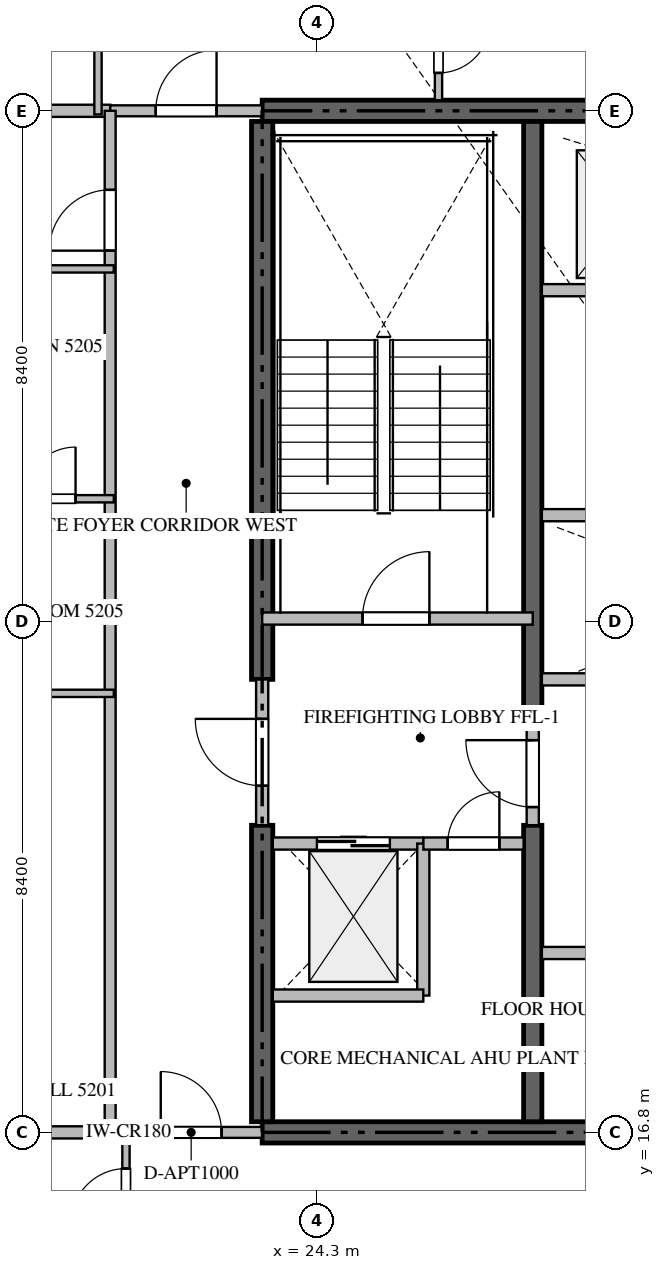
"""IFC4 building model, lengths in metres.
Left out: names, types, materials, properties, quantities, classifications, styles, units other than length and angle.
Written with IfcOpenShell. Run it as: python <this file> out.ifc"""

import sys

from ifc_helpers import new_model, si_unit, direction, frame, frame_2d, origin, place, context, subcontext, project, spatial, rectangle, extrude, source, transform, mapped, element, fill, save


model = new_model("IFC4")
c1 = context("Model", 3, precision=1e-05, world=origin(), true_north=direction((0.0, 1.0)))
c2 = subcontext(c1, "Body", "Model", "MODEL_VIEW")
j1 = project(units=[si_unit("LENGTHUNIT", "METRE"), si_unit("PLANEANGLEUNIT", "RADIAN")], contexts=[c1])
p1 = place(None, origin())
s1 = spatial("IfcSite", under=j1, at=p1, CompositionType="ELEMENT")
p2 = place(p1, origin())
s2 = spatial("IfcBuilding", under=s1, at=p2, CompositionType="ELEMENT")
p3 = place(p2, frame((0.0, 0.0, 210.45)))
s3 = spatial("IfcBuildingStorey", under=s2, at=p3, CompositionType="ELEMENT", Elevation=210.45)
for number, where, z_axis, x_axis in (
    (1, (23.4, 16.8, -0.44), (0.0, 0.0, 1.0), (1.0, 0.0, 0.0)),
    (2, (41.4, 33.6, -0.44), (0.0, 0.0, 1.0), (-1.0, 0.0, 0.0)),
):
    element("IfcWall", number, at=place(p3, frame(where, z_axis=z_axis, x_axis=x_axis)), inside=s3, PredefinedType="SHEAR", context=c2, shape_type="SweptSolid", body=[
        extrude(rectangle(XDim=18.0, YDim=0.35, at=frame_2d((9.0, 0.0))), origin(), (0.0, 0.0, 1.0), 4.028),
    ])
p4 = place(p3, frame((23.4, 16.975, -0.44), z_axis=(0.0, 0.0, 1.0), x_axis=(0.0, 1.0, 0.0)))
e3 = element("IfcWall", 3, at=p4, inside=s3, PredefinedType="SHEAR", context=c2, shape_type="SweptSolid", body=[
    extrude(rectangle(XDim=4.875, YDim=0.35, at=frame_2d((2.438, 0.0))), origin(), (0.0, 0.0, 1.0), 4.028),
])
p5 = place(p3, frame((23.4, 24.25, -0.44), z_axis=(0.0, 0.0, 1.0), x_axis=(0.0, 1.0, 0.0)))
e4 = element("IfcWall", 4, at=p5, inside=s3, PredefinedType="SHEAR", context=c2, shape_type="SweptSolid", body=[
    extrude(rectangle(XDim=9.175, YDim=0.35, at=frame_2d((4.587, 0.0))), origin(), (0.0, 0.0, 1.0), 4.028),
])
p6 = place(p3, frame((27.85, 16.975, -0.44), z_axis=(0.0, 0.0, 1.0), x_axis=(0.0, 1.0, 0.0)))
e5 = element("IfcWall", 5, at=p6, inside=s3, PredefinedType="SHEAR", context=c2, shape_type="SweptSolid", body=[
    extrude(rectangle(XDim=4.875, YDim=0.3, at=frame_2d((2.438, 0.0))), origin(), (0.0, 0.0, 1.0), 4.028),
])
p7 = place(p3, frame((27.85, 23.55, -0.44), z_axis=(0.0, 0.0, 1.0), x_axis=(0.0, 1.0, 0.0)))
e6 = element("IfcWall", 6, at=p7, inside=s3, PredefinedType="SHEAR", context=c2, shape_type="SweptSolid", body=[
    extrude(rectangle(XDim=9.875, YDim=0.3, at=frame_2d((4.938, 0.0))), origin(), (0.0, 0.0, 1.0), 4.028),
])
p8 = place(p3, frame((23.4, 25.25, 0.0), z_axis=(0.0, 0.0, 1.0), x_axis=(1.0, 0.0, 0.0)))
e7 = element("IfcWall", 7, at=p8, inside=s3, PredefinedType="STANDARD", context=c2, shape_type="SweptSolid", body=[
    extrude(rectangle(XDim=4.45, YDim=0.2, at=frame_2d((2.225, 0.0))), origin(), (0.0, 0.0, 1.0), 3.59),
])
p9 = place(p8, frame((1.65, 0.0, 0.0)))
e8 = element("IfcOpeningElement", 8, at=p9, cuts=e7, PredefinedType="OPENING", context=c2, shape_type="SweptSolid", body=[
    extrude(rectangle(XDim=1.1, YDim=2.15, at=frame_2d((0.55, 1.075))), frame((0.0, 0.11, 0.0), z_axis=(0.0, -1.0, 0.0), x_axis=(1.0, 0.0, 0.0)), (0.0, 0.0, 1.0), 0.22),
])
p10 = place(p3, frame((23.575, 21.55, 0.0), z_axis=(0.0, 0.0, 1.0), x_axis=(1.0, 0.0, 0.0)))
e9 = element("IfcWall", 9, at=p10, inside=s3, PredefinedType="STANDARD", context=c2, shape_type="SweptSolid", body=[
    extrude(rectangle(XDim=2.475, YDim=0.2, at=frame_2d((1.238, 0.0))), origin(), (0.0, 0.0, 1.0), 3.59),
])
p11 = place(p10, frame((0.725, 0.0, 0.0)))
e10 = element("IfcOpeningElement", 10, at=p11, cuts=e9, PredefinedType="OPENING", context=c2, shape_type="SweptSolid", body=[
    extrude(rectangle(XDim=1.2, YDim=2.2, at=frame_2d((0.6, 1.1))), frame((0.0, 0.11, 0.0), z_axis=(0.0, -1.0, 0.0), x_axis=(1.0, 0.0, 0.0)), (0.0, 0.0, 1.0), 0.22),
])
p12 = place(p3, frame((28.0, 24.25, 0.0), z_axis=(0.0, 0.0, 1.0), x_axis=(1.0, 0.0, 0.0)))
e11 = element("IfcWall", 11, at=p12, inside=s3, PredefinedType="STANDARD", context=c2, shape_type="SweptSolid", body=[
    extrude(rectangle(XDim=2.425, YDim=0.2, at=frame_2d((1.212, 0.0))), origin(), (0.0, 0.0, 1.0), 3.59),
])
p13 = place(p3, frame((28.0, 30.65, 0.0), z_axis=(0.0, 0.0, 1.0), x_axis=(1.0, 0.0, 0.0)))
e12 = element("IfcWall", 12, at=p13, inside=s3, PredefinedType="STANDARD", context=c2, shape_type="SweptSolid", body=[
    extrude(rectangle(XDim=2.55, YDim=0.2, at=frame_2d((1.275, 0.0))), origin(), (0.0, 0.0, 1.0), 3.59),
])
p14 = place(p13, frame((0.85, 0.0, 0.0)))
e13 = element("IfcOpeningElement", 13, at=p14, cuts=e12, PredefinedType="OPENING", context=c2, shape_type="SweptSolid", body=[
    extrude(rectangle(XDim=1.1, YDim=2.2, at=frame_2d((0.55, 1.1))), frame((0.0, 0.11, 0.0), z_axis=(0.0, -1.0, 0.0), x_axis=(1.0, 0.0, 0.0)), (0.0, 0.0, 1.0), 0.22),
])
p15 = place(p3, frame((26.05, 19.05, 0.0), z_axis=(0.0, 0.0, 1.0), x_axis=(0.0, 1.0, 0.0)))
e14 = element("IfcWall", 14, at=p15, inside=s3, PredefinedType="STANDARD", context=c2, shape_type="SweptSolid", body=[
    extrude(rectangle(XDim=2.5, YDim=0.2, at=frame_2d((1.25, 0.0))), origin(), (0.0, 0.0, 1.0), 3.59),
])
p16 = place(p3, frame((23.575, 19.05, 0.0), z_axis=(0.0, 0.0, 1.0), x_axis=(1.0, 0.0, 0.0)))
e15 = element("IfcWall", 15, at=p16, inside=s3, PredefinedType="STANDARD", context=c2, shape_type="SweptSolid", body=[
    extrude(rectangle(XDim=2.475, YDim=0.2, at=frame_2d((1.238, 0.0))), origin(), (0.0, 0.0, 1.0), 3.59),
])
p17 = place(p3, frame((26.052, 21.55, 0.0), z_axis=(0.0, 0.0, 1.0), x_axis=(1.0, 0.0, 0.0)))
e16 = element("IfcWall", 16, at=p17, inside=s3, PredefinedType="STANDARD", context=c2, shape_type="SweptSolid", body=[
    extrude(rectangle(XDim=1.648, YDim=0.2, at=frame_2d((0.824, 0.0))), origin(), (0.0, 0.0, 1.0), 3.59),
])
p18 = place(p17, frame((0.399, 0.0, 0.0)))
e17 = element("IfcOpeningElement", 17, at=p18, cuts=e16, PredefinedType="OPENING", context=c2, shape_type="SweptSolid", body=[
    extrude(rectangle(XDim=0.85, YDim=2.1, at=frame_2d((0.425, 1.05))), frame((0.0, 0.11, 0.0), z_axis=(0.0, -1.0, 0.0), x_axis=(1.0, 0.0, 0.0)), (0.0, 0.0, 1.0), 0.22),
])
p19 = place(p3, frame((23.4, 21.852, 0.0), z_axis=(0.0, 0.0, 1.0), x_axis=(0.0, 1.0, 0.0)))
e18 = element("IfcWall", 18, at=p19, inside=s3, PredefinedType="STANDARD", context=c2, shape_type="SweptSolid", body=[
    extrude(rectangle(XDim=2.396, YDim=0.2, at=frame_2d((1.198, 0.0))), origin(), (0.0, 0.0, 1.0), 3.59),
])
p20 = place(p19, frame((0.648, 0.0, 0.0)))
e19 = element("IfcOpeningElement", 19, at=p20, cuts=e18, PredefinedType="OPENING", context=c2, shape_type="SweptSolid", body=[
    extrude(rectangle(XDim=1.1, YDim=2.15, at=frame_2d((0.55, 1.075))), frame((0.0, 0.11, 0.0), z_axis=(0.0, -1.0, 0.0), x_axis=(1.0, 0.0, 0.0)), (0.0, 0.0, 1.0), 0.22),
])
p21 = place(p3, frame((27.85, 21.852, 0.0), z_axis=(0.0, 0.0, 1.0), x_axis=(0.0, 1.0, 0.0)))
e20 = element("IfcWall", 20, at=p21, inside=s3, PredefinedType="STANDARD", context=c2, shape_type="SweptSolid", body=[
    extrude(rectangle(XDim=1.696, YDim=0.2, at=frame_2d((0.848, 0.0))), origin(), (0.0, 0.0, 1.0), 3.59),
])
p22 = place(p21, frame((0.298, 0.0, 0.0)))
e21 = element("IfcOpeningElement", 21, at=p22, cuts=e20, PredefinedType="OPENING", context=c2, shape_type="SweptSolid", body=[
    extrude(rectangle(XDim=1.1, YDim=2.15, at=frame_2d((0.55, 1.075))), frame((0.0, 0.11, 0.0), z_axis=(0.0, -1.0, 0.0), x_axis=(1.0, 0.0, 0.0)), (0.0, 0.0, 1.0), 0.22),
])
p23 = place(p3, frame((28.0, 26.95, 0.0), z_axis=(0.0, 0.0, 1.0), x_axis=(1.0, 0.0, 0.0)))
e22 = element("IfcWall", 22, at=p23, inside=s3, PredefinedType="STANDARD", context=c2, shape_type="SweptSolid", body=[
    extrude(rectangle(XDim=6.95, YDim=0.2, at=frame_2d((3.475, 0.0))), origin(), (0.0, 0.0, 1.0), 3.59),
])
p24 = place(p3, frame((28.0, 19.75, 0.0), z_axis=(0.0, 0.0, 1.0), x_axis=(1.0, 0.0, 0.0)))
e23 = element("IfcWall", 23, at=p24, inside=s3, PredefinedType="STANDARD", context=c2, shape_type="SweptSolid", body=[
    extrude(rectangle(XDim=3.9, YDim=0.2, at=frame_2d((1.95, 0.0))), origin(), (0.0, 0.0, 1.0), 3.59),
])
p25 = place(p24, frame((1.5, 0.0, 0.0)))
e24 = element("IfcOpeningElement", 24, at=p25, cuts=e23, PredefinedType="OPENING", context=c2, shape_type="SweptSolid", body=[
    extrude(rectangle(XDim=0.9, YDim=2.1, at=frame_2d((0.45, 1.05))), frame((0.0, 0.11, 0.0), z_axis=(0.0, -1.0, 0.0), x_axis=(1.0, 0.0, 0.0)), (0.0, 0.0, 1.0), 0.22),
])
for number, where, z_axis, x_axis in (
    (25, (7.482, 16.8, 0.0), (0.0, 0.0, 1.0), (1.0, 0.0, 0.0)),
    (26, (7.482, 33.6, 0.0), (0.0, 0.0, 1.0), (1.0, 0.0, 0.0)),
):
    element("IfcWall", number, at=place(p3, frame(where, z_axis=z_axis, x_axis=x_axis)), inside=s3, PredefinedType="PARTITIONING", context=c2, shape_type="SweptSolid", body=[
        extrude(rectangle(XDim=13.418, YDim=0.2, at=frame_2d((6.709, 0.0))), origin(), (0.0, 0.0, 1.0), 3.59),
    ])
p26 = place(p3, frame((20.902, 16.8, 0.0), z_axis=(0.0, 0.0, 1.0), x_axis=(1.0, 0.0, 0.0)))
e27 = element("IfcWall", 27, at=p26, inside=s3, PredefinedType="PARTITIONING", context=c2, shape_type="SweptSolid", body=[
    extrude(rectangle(XDim=2.496, YDim=0.18, at=frame_2d((1.248, 0.0))), origin(), (0.0, 0.0, 1.0), 3.59),
])
p27 = place(p26, frame((0.83, 0.0, 0.0)))
e28 = element("IfcOpeningElement", 28, at=p27, cuts=e27, PredefinedType="OPENING", context=c2, shape_type="SweptSolid", body=[
    extrude(rectangle(XDim=1.0, YDim=2.15, at=frame_2d((0.5, 1.075))), frame((0.0, 0.1, 0.0), z_axis=(0.0, -1.0, 0.0), x_axis=(1.0, 0.0, 0.0)), (0.0, 0.0, 1.0), 0.2),
])
p28 = place(p3, frame((20.902, 33.6, 0.0), z_axis=(0.0, 0.0, 1.0), x_axis=(1.0, 0.0, 0.0)))
e29 = element("IfcWall", 29, at=p28, inside=s3, PredefinedType="PARTITIONING", context=c2, shape_type="SweptSolid", body=[
    extrude(rectangle(XDim=2.496, YDim=0.18, at=frame_2d((1.248, 0.0))), origin(), (0.0, 0.0, 1.0), 3.59),
])
p29 = place(p28, frame((0.748, 0.0, 0.0)))
e30 = element("IfcOpeningElement", 30, at=p29, cuts=e29, PredefinedType="OPENING", context=c2, shape_type="SweptSolid", body=[
    extrude(rectangle(XDim=1.0, YDim=2.15, at=frame_2d((0.5, 1.075))), frame((0.0, 0.1, 0.0), z_axis=(0.0, -1.0, 0.0), x_axis=(1.0, 0.0, 0.0)), (0.0, 0.0, 1.0), 0.2),
])
p30 = place(p3, frame((20.9, 16.8, 0.0), z_axis=(0.0, 0.0, 1.0), x_axis=(0.0, 1.0, 0.0)))
e31 = element("IfcWall", 31, at=p30, inside=s3, PredefinedType="PARTITIONING", context=c2, shape_type="SweptSolid", body=[
    extrude(rectangle(XDim=16.8, YDim=0.18, at=frame_2d((8.4, 0.0))), origin(), (0.0, 0.0, 1.0), 3.59),
])
p31 = place(p30, frame((14.5, 0.0, 0.0)))
e32 = element("IfcOpeningElement", 32, at=p31, cuts=e31, PredefinedType="OPENING", context=c2, shape_type="SweptSolid", body=[
    extrude(rectangle(XDim=1.0, YDim=2.15, at=frame_2d((0.5, 1.075))), frame((0.0, 0.1, 0.0), z_axis=(0.0, -1.0, 0.0), x_axis=(1.0, 0.0, 0.0)), (0.0, 0.0, 1.0), 0.2),
])
p32 = place(p3, frame((21.16, 14.65, 0.0), z_axis=(0.0, 0.0, 1.0), x_axis=(0.0, 1.0, 0.0)))
e33 = element("IfcWall", 33, at=p32, inside=s3, PredefinedType="PARTITIONING", context=c2, shape_type="SweptSolid", body=[
    extrude(rectangle(XDim=2.21, YDim=0.12, at=frame_2d((1.105, 0.0))), origin(), (0.0, 0.0, 1.0), 3.59),
])
p33 = place(p32, frame((0.655, 0.0, 0.0)))
e34 = element("IfcOpeningElement", 34, at=p33, cuts=e33, PredefinedType="OPENING", context=c2, shape_type="SweptSolid", body=[
    extrude(rectangle(XDim=0.9, YDim=2.1, at=frame_2d((0.45, 1.05))), frame((0.0, 0.07, 0.0), z_axis=(0.0, -1.0, 0.0), x_axis=(1.0, 0.0, 0.0)), (0.0, 0.0, 1.0), 0.14),
])
p34 = place(p3, frame((20.7, 36.35, 0.0), z_axis=(0.0, 0.0, 1.0), x_axis=(0.0, -1.0, 0.0)))
e35 = element("IfcWall", 35, at=p34, inside=s3, PredefinedType="PARTITIONING", context=c2, shape_type="SweptSolid", body=[
    extrude(rectangle(XDim=2.81, YDim=0.12, at=frame_2d((1.405, 0.0))), origin(), (0.0, 0.0, 1.0), 3.59),
])
p35 = place(p3, frame((26.3, 35.648, 0.0), z_axis=(0.0, 0.0, 1.0), x_axis=(0.0, -1.0, 0.0)))
e36 = element("IfcWall", 36, at=p35, inside=s3, PredefinedType="PARTITIONING", context=c2, shape_type="SweptSolid", body=[
    extrude(rectangle(XDim=1.873, YDim=0.12, at=frame_2d((0.937, 0.0))), origin(), (0.0, 0.0, 1.0), 3.59),
])
p36 = place(p35, frame((0.575, 0.0, 0.0)))
e37 = element("IfcOpeningElement", 37, at=p36, cuts=e36, PredefinedType="OPENING", context=c2, shape_type="SweptSolid", body=[
    extrude(rectangle(XDim=0.85, YDim=2.1, at=frame_2d((0.425, 1.05))), frame((0.0, 0.07, 0.0), z_axis=(0.0, -1.0, 0.0), x_axis=(1.0, 0.0, 0.0)), (0.0, 0.0, 1.0), 0.14),
])
p37 = place(p3, frame((18.15, 31.0, 0.0), z_axis=(0.0, 0.0, 1.0), x_axis=(1.0, 0.0, 0.0)))
e38 = element("IfcWall", 38, at=p37, inside=s3, PredefinedType="PARTITIONING", context=c2, shape_type="SweptSolid", body=[
    extrude(rectangle(XDim=2.81, YDim=0.12, at=frame_2d((1.405, 0.0))), origin(), (0.0, 0.0, 1.0), 3.59),
])
p38 = place(p3, frame((18.85, 24.02, 0.0), z_axis=(0.0, 0.0, 1.0), x_axis=(1.0, 0.0, 0.0)))
e39 = element("IfcWall", 39, at=p38, inside=s3, PredefinedType="PARTITIONING", context=c2, shape_type="SweptSolid", body=[
    extrude(rectangle(XDim=2.11, YDim=0.12, at=frame_2d((1.055, 0.0))), origin(), (0.0, 0.0, 1.0), 3.59),
])
p39 = place(p3, frame((18.852, 27.22, 0.0), z_axis=(0.0, 0.0, 1.0), x_axis=(1.0, 0.0, 0.0)))
e40 = element("IfcWall", 40, at=p39, inside=s3, PredefinedType="PARTITIONING", context=c2, shape_type="SweptSolid", body=[
    extrude(rectangle(XDim=2.108, YDim=0.12, at=frame_2d((1.054, 0.0))), origin(), (0.0, 0.0, 1.0), 3.59),
])
p40 = place(p39, frame((0.629, 0.0, 0.0)))
e41 = element("IfcOpeningElement", 41, at=p40, cuts=e40, PredefinedType="OPENING", context=c2, shape_type="SweptSolid", body=[
    extrude(rectangle(XDim=0.85, YDim=2.1, at=frame_2d((0.425, 1.05))), frame((0.0, 0.07, 0.0), z_axis=(0.0, -1.0, 0.0), x_axis=(1.0, 0.0, 0.0)), (0.0, 0.0, 1.0), 0.14),
])
m1 = source(origin(), c2, "Body", "SweptSolid", [
    extrude(rectangle(XDim=1.1, YDim=2.15, at=frame_2d((0.55, 1.075))), frame((0.0, 0.025, 0.0), z_axis=(0.0, -1.0, 0.0), x_axis=(1.0, 0.0, 0.0)), (0.0, 0.0, 1.0), 0.05),
])
p41 = place(p9, origin())
e42 = element("IfcDoor", 42, at=p41, inside=s3, OperationType="SINGLE_SWING_RIGHT", PredefinedType="DOOR", context=c2, shape_type="MappedRepresentation", body=[
    mapped(m1, transform((0.0, 0.0, 0.0), scale=1.0)),
])
fill(e8, e42)
m2 = source(origin(), c2, "Body", "SweptSolid", [
    extrude(rectangle(XDim=1.2, YDim=2.2, at=frame_2d((0.6, 1.1))), frame((0.0, 0.025, 0.0), z_axis=(0.0, -1.0, 0.0), x_axis=(1.0, 0.0, 0.0)), (0.0, 0.0, 1.0), 0.05),
])
p42 = place(p11, origin())
e43 = element("IfcDoor", 43, at=p42, inside=s3, OperationType="DOUBLE_DOOR_SLIDING", PredefinedType="DOOR", context=c2, shape_type="MappedRepresentation", body=[
    mapped(m2, transform((0.0, 0.0, 0.0), scale=1.0)),
])
fill(e10, e43)
m3 = source(origin(), c2, "Body", "SweptSolid", [
    extrude(rectangle(XDim=0.85, YDim=2.1, at=frame_2d((0.425, 1.05))), frame((0.0, 0.025, 0.0), z_axis=(0.0, -1.0, 0.0), x_axis=(1.0, 0.0, 0.0)), (0.0, 0.0, 1.0), 0.05),
])
p43 = place(p18, origin())
e44 = element("IfcDoor", 44, at=p43, inside=s3, OperationType="SINGLE_SWING_RIGHT", PredefinedType="DOOR", context=c2, shape_type="MappedRepresentation", body=[
    mapped(m3, transform((0.0, 0.0, 0.0), scale=1.0)),
])
fill(e17, e44)
p44 = place(p20, origin())
e45 = element("IfcDoor", 45, at=p44, inside=s3, OperationType="SINGLE_SWING_RIGHT", PredefinedType="DOOR", context=c2, shape_type="MappedRepresentation", body=[
    mapped(m1, transform((0.0, 0.0, 0.0), scale=1.0)),
])
fill(e19, e45)
p45 = place(p22, origin())
e46 = element("IfcDoor", 46, at=p45, inside=s3, OperationType="SINGLE_SWING_RIGHT", PredefinedType="DOOR", context=c2, shape_type="MappedRepresentation", body=[
    mapped(m1, transform((0.0, 0.0, 0.0), scale=1.0)),
])
fill(e21, e46)
m4 = source(origin(), c2, "Body", "SweptSolid", [
    extrude(rectangle(XDim=1.0, YDim=2.15, at=frame_2d((0.5, 1.075))), frame((0.0, 0.025, 0.0), z_axis=(0.0, -1.0, 0.0), x_axis=(1.0, 0.0, 0.0)), (0.0, 0.0, 1.0), 0.05),
])
p46 = place(p27, origin())
e47 = element("IfcDoor", 47, at=p46, inside=s3, OperationType="SINGLE_SWING_LEFT", PredefinedType="DOOR", context=c2, shape_type="MappedRepresentation", body=[
    mapped(m4, transform((0.0, 0.0, 0.0), scale=1.0)),
])
fill(e28, e47)
p47 = place(p29, origin())
e48 = element("IfcDoor", 48, at=p47, inside=s3, OperationType="SINGLE_SWING_RIGHT", PredefinedType="DOOR", context=c2, shape_type="MappedRepresentation", body=[
    mapped(m4, transform((0.0, 0.0, 0.0), scale=1.0)),
])
fill(e30, e48)
p48 = place(p31, origin())
e49 = element("IfcDoor", 49, at=p48, inside=s3, OperationType="SINGLE_SWING_LEFT", PredefinedType="DOOR", context=c2, shape_type="MappedRepresentation", body=[
    mapped(m4, transform((0.0, 0.0, 0.0), scale=1.0)),
])
fill(e32, e49)
m5 = source(origin(), c2, "Body", "SweptSolid", [
    extrude(rectangle(XDim=0.9, YDim=2.1, at=frame_2d((0.45, 1.05))), frame((0.0, 0.025, 0.0), z_axis=(0.0, -1.0, 0.0), x_axis=(1.0, 0.0, 0.0)), (0.0, 0.0, 1.0), 0.05),
])
p49 = place(p33, origin())
e50 = element("IfcDoor", 50, at=p49, inside=s3, OperationType="SINGLE_SWING_LEFT", PredefinedType="DOOR", context=c2, shape_type="MappedRepresentation", body=[
    mapped(m5, transform((0.0, 0.0, 0.0), scale=1.0)),
])
fill(e34, e50)
p50 = place(p36, origin())
e51 = element("IfcDoor", 51, at=p50, inside=s3, OperationType="SINGLE_SWING_LEFT", PredefinedType="DOOR", context=c2, shape_type="MappedRepresentation", body=[
    mapped(m3, transform((0.0, 0.0, 0.0), scale=1.0)),
])
fill(e37, e51)
p51 = place(p40, origin())
e52 = element("IfcDoor", 52, at=p51, inside=s3, OperationType="SINGLE_SWING_RIGHT", PredefinedType="DOOR", context=c2, shape_type="MappedRepresentation", body=[
    mapped(m3, transform((0.0, 0.0, 0.0), scale=1.0)),
])
fill(e41, e52)
save(model, sys.argv[1])
